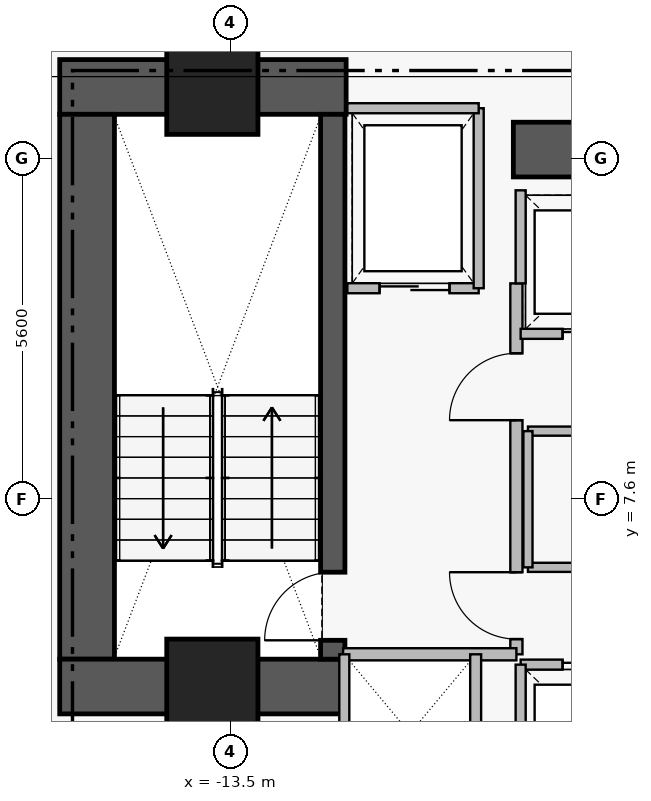
"""IFC4 building model, lengths in metres.
Left out: names, types, materials, properties, quantities, classifications, styles, units other than length and angle.
Written with IfcOpenShell. Run it as: python <this file> out.ifc"""

import sys

from ifc_helpers import new_model, si_unit, direction, frame, frame_2d, origin, origin_2d, place, context, subcontext, project, spatial, rectangle, extrude, element, fill, save


model = new_model("IFC4")
c1 = context("Model", 3, precision=1e-05, world=origin(), true_north=direction((0.0, 1.0)))
c2 = subcontext(c1, "Body", "Model", "MODEL_VIEW")
j1 = project(units=[si_unit("LENGTHUNIT", "METRE"), si_unit("PLANEANGLEUNIT", "RADIAN")], contexts=[c1])
p1 = place(None, origin())
s1 = spatial("IfcSite", under=j1, at=p1, CompositionType="ELEMENT")
p2 = place(p1, origin())
s2 = spatial("IfcBuilding", under=s1, at=p2, CompositionType="ELEMENT")
p3 = place(p2, frame((0.0, 0.0, 11.4)))
s3 = spatial("IfcBuildingStorey", under=s2, at=p3, CompositionType="ELEMENT", Elevation=11.4)
p4 = place(p3, frame((-16.31, 14.38, 0.0), z_axis=(0.0, 0.0, 1.0), x_axis=(1.0, 0.0, 0.0)))
e1 = element("IfcWall", 1, at=p4, inside=s3, PredefinedType="SHEAR", context=c2, shape_type="SweptSolid", body=[
    extrude(rectangle(XDim=4.71, YDim=0.9, at=frame_2d((2.355, 0.0))), origin(), (0.0, 0.0, 1.0), 6.41),
])
p5 = place(p3, frame((-15.86, 4.97, 0.0), z_axis=(0.0, 0.0, 1.0), x_axis=(0.0, 1.0, 0.0)))
e2 = element("IfcWall", 2, at=p5, inside=s3, PredefinedType="SHEAR", context=c2, shape_type="SweptSolid", body=[
    extrude(rectangle(XDim=8.96, YDim=0.9, at=frame_2d((4.48, 0.0))), origin(), (0.0, 0.0, 1.0), 6.41),
])
p6 = place(p3, frame((-16.31, 4.52, 0.0), z_axis=(0.0, 0.0, 1.0), x_axis=(1.0, 0.0, 0.0)))
e3 = element("IfcWall", 3, at=p6, inside=s3, PredefinedType="SHEAR", context=c2, shape_type="SweptSolid", body=[
    extrude(rectangle(XDim=4.71, YDim=0.9, at=frame_2d((2.355, 0.0))), origin(), (0.0, 0.0, 1.0), 6.41),
])
p7 = place(p3, frame((-8.85, 13.35, 0.0), z_axis=(0.0, 0.0, 1.0), x_axis=(1.0, 0.0, 0.0)))
e4 = element("IfcWall", 4, at=p7, inside=s3, PredefinedType="SHEAR", context=c2, shape_type="SweptSolid", body=[
    extrude(rectangle(XDim=7.6, YDim=0.9, at=frame_2d((3.8, 0.0))), origin(), (0.0, 0.0, 1.0), 6.34),
])
p8 = place(p3, frame((-11.82, 4.97, 0.0), z_axis=(0.0, 0.0, 1.0), x_axis=(0.0, 1.0, 0.0)))
e5 = element("IfcWall", 5, at=p8, inside=s3, PredefinedType="SHEAR", context=c2, shape_type="SweptSolid", body=[
    extrude(rectangle(XDim=8.96, YDim=0.4, at=frame_2d((4.48, 0.0))), origin(), (0.0, 0.0, 1.0), 6.41),
])
p9 = place(p8, frame((0.31, 0.0, 0.0)))
e6 = element("IfcOpeningElement", 6, at=p9, cuts=e5, PredefinedType="OPENING", context=c2, shape_type="SweptSolid", body=[
    extrude(rectangle(XDim=1.12, YDim=2.22, at=frame_2d((0.56, 1.11))), frame((0.0, 0.21, 0.0), z_axis=(0.0, -1.0, 0.0), x_axis=(1.0, 0.0, 0.0)), (0.0, 0.0, 1.0), 0.42),
])
for number, where, z_axis, x_axis in (
    (7, (-13.8, 14.35, 0.0), (0.0, 0.0, 1.0), (1.0, 0.0, 0.0)),
    (8, (-13.8, 4.55, 0.0), (0.0, 0.0, 1.0), (1.0, 0.0, 0.0)),
):
    element("IfcColumn", number, at=place(p3, frame(where, z_axis=z_axis, x_axis=x_axis)), inside=s3, PredefinedType="COLUMN", context=c2, shape_type="SweptSolid", body=[
        extrude(rectangle(XDim=1.5, YDim=1.5, at=origin_2d()), origin(), (0.0, 0.0, 1.0), 6.6),
    ])
p10 = place(p3, frame((-8.8, 5.05, 0.0), z_axis=(0.0, 0.0, 1.0), x_axis=(0.0, 1.0, 0.0)))
e9 = element("IfcWall", 9, at=p10, inside=s3, PredefinedType="PARTITIONING", context=c2, shape_type="SweptSolid", body=[
    extrude(rectangle(XDim=6.1, YDim=0.2, at=frame_2d((3.05, 0.0))), origin(), (0.0, 0.0, 1.0), 6.34),
])
p11 = place(p10, frame((0.25, 0.0, 0.0)))
e10 = element("IfcOpeningElement", 10, at=p11, cuts=e9, PredefinedType="OPENING", context=c2, shape_type="SweptSolid", body=[
    extrude(rectangle(XDim=1.1, YDim=2.2, at=frame_2d((0.55, 1.1))), frame((0.0, 0.11, 0.0), z_axis=(0.0, -1.0, 0.0), x_axis=(1.0, 0.0, 0.0)), (0.0, 0.0, 1.0), 0.22),
])
p12 = place(p10, frame((3.85, 0.0, 0.0)))
e11 = element("IfcOpeningElement", 11, at=p12, cuts=e9, PredefinedType="OPENING", context=c2, shape_type="SweptSolid", body=[
    extrude(rectangle(XDim=1.1, YDim=2.2, at=frame_2d((0.55, 1.1))), frame((0.0, 0.11, 0.0), z_axis=(0.0, -1.0, 0.0), x_axis=(1.0, 0.0, 0.0)), (0.0, 0.0, 1.0), 0.22),
])
p13 = place(p3, frame((-11.58, 11.07, 0.0), z_axis=(0.0, 0.0, 1.0), x_axis=(1.0, 0.0, 0.0)))
e12 = element("IfcWall", 12, at=p13, inside=s3, PredefinedType="PARTITIONING", context=c2, shape_type="SweptSolid", body=[
    extrude(rectangle(XDim=2.16, YDim=0.165, at=frame_2d((1.08, 0.0))), origin(), (0.0, 0.0, 1.0), 6.34),
])
p14 = place(p13, frame((0.53, 0.0, 0.0)))
e13 = element("IfcOpeningElement", 13, at=p14, cuts=e12, PredefinedType="OPENING", context=c2, shape_type="SweptSolid", body=[
    extrude(rectangle(XDim=1.15, YDim=2.25, at=frame_2d((0.575, 1.125))), frame((0.0, 0.093, 0.0), z_axis=(0.0, -1.0, 0.0), x_axis=(1.0, 0.0, 0.0)), (0.0, 0.0, 1.0), 0.185),
])
p15 = place(p3, frame((-8.73, 4.88, 0.0), z_axis=(0.0, 0.0, 1.0), x_axis=(1.0, 0.0, 0.0)))
e14 = element("IfcWall", 14, at=p15, inside=s3, PredefinedType="PARTITIONING", context=c2, shape_type="SweptSolid", body=[
    extrude(rectangle(XDim=2.48, YDim=0.165, at=frame_2d((1.24, 0.0))), origin(), (0.0, 0.0, 1.0), 6.34),
])
p16 = place(p15, frame((0.69, 0.0, 0.0)))
e15 = element("IfcOpeningElement", 15, at=p16, cuts=e14, PredefinedType="OPENING", context=c2, shape_type="SweptSolid", body=[
    extrude(rectangle(XDim=1.1, YDim=2.25, at=frame_2d((0.55, 1.125))), frame((0.0, 0.093, 0.0), z_axis=(0.0, -1.0, 0.0), x_axis=(1.0, 0.0, 0.0)), (0.0, 0.0, 1.0), 0.185),
])
p17 = place(p3, frame((-8.73, 10.32, 0.0), z_axis=(0.0, 0.0, 1.0), x_axis=(1.0, 0.0, 0.0)))
e16 = element("IfcWall", 16, at=p17, inside=s3, PredefinedType="PARTITIONING", context=c2, shape_type="SweptSolid", body=[
    extrude(rectangle(XDim=2.48, YDim=0.165, at=frame_2d((1.24, 0.0))), origin(), (0.0, 0.0, 1.0), 6.34),
])
p18 = place(p17, frame((0.69, 0.0, 0.0)))
e17 = element("IfcOpeningElement", 17, at=p18, cuts=e16, PredefinedType="OPENING", context=c2, shape_type="SweptSolid", body=[
    extrude(rectangle(XDim=1.1, YDim=2.25, at=frame_2d((0.55, 1.125))), frame((0.0, 0.093, 0.0), z_axis=(0.0, -1.0, 0.0), x_axis=(1.0, 0.0, 0.0)), (0.0, 0.0, 1.0), 0.185),
])
p19 = place(p3, frame((-8.61, 6.48, 0.0), z_axis=(0.0, 0.0, 1.0), x_axis=(1.0, 0.0, 0.0)))
e18 = element("IfcWall", 18, at=p19, inside=s3, PredefinedType="PARTITIONING", context=c2, shape_type="SweptSolid", body=[
    extrude(rectangle(XDim=7.29, YDim=0.15, at=frame_2d((3.645, 0.0))), origin(), (0.0, 0.0, 1.0), 6.34),
])
p20 = place(p19, frame((3.195, 0.0, 0.0)))
e19 = element("IfcOpeningElement", 19, at=p20, cuts=e18, PredefinedType="OPENING", context=c2, shape_type="SweptSolid", body=[
    extrude(rectangle(XDim=0.9, YDim=2.15, at=frame_2d((0.45, 1.075))), frame((0.0, 0.085, 0.0), z_axis=(0.0, -1.0, 0.0), x_axis=(1.0, 0.0, 0.0)), (0.0, 0.0, 1.0), 0.17),
])
p21 = place(p3, frame((-11.65, 5.05, 0.0), z_axis=(0.0, 0.0, 1.0), x_axis=(1.0, 0.0, 0.0)))
e20 = element("IfcWall", 20, at=p21, inside=s3, PredefinedType="PARTITIONING", context=c2, shape_type="SweptSolid", body=[
    extrude(rectangle(XDim=2.85, YDim=0.2, at=frame_2d((1.425, 0.0))), origin(), (0.0, 0.0, 1.0), 6.34),
])
p22 = place(p3, frame((-9.42, 11.07, 0.0), z_axis=(0.0, 0.0, 1.0), x_axis=(0.0, 1.0, 0.0)))
e21 = element("IfcWall", 21, at=p22, inside=s3, PredefinedType="PARTITIONING", context=c2, shape_type="SweptSolid", body=[
    extrude(rectangle(XDim=2.96, YDim=0.165, at=frame_2d((1.48, 0.0))), origin(), (0.0, 0.0, 1.0), 6.34),
])
p23 = place(p3, frame((-11.58, 14.03, 0.0), z_axis=(0.0, 0.0, 1.0), x_axis=(1.0, 0.0, 0.0)))
e22 = element("IfcWall", 22, at=p23, inside=s3, PredefinedType="PARTITIONING", context=c2, shape_type="SweptSolid", body=[
    extrude(rectangle(XDim=2.16, YDim=0.165, at=frame_2d((1.08, 0.0))), origin(), (0.0, 0.0, 1.0), 6.34),
])
p24 = place(p3, frame((-8.73, 2.52, 0.0), z_axis=(0.0, 0.0, 1.0), x_axis=(0.0, 1.0, 0.0)))
e23 = element("IfcWall", 23, at=p24, inside=s3, PredefinedType="PARTITIONING", context=c2, shape_type="SweptSolid", body=[
    extrude(rectangle(XDim=2.36, YDim=0.165, at=frame_2d((1.18, 0.0))), origin(), (0.0, 0.0, 1.0), 6.34),
])
p25 = place(p3, frame((-8.73, 11.15, 0.0), z_axis=(0.0, 0.0, 1.0), x_axis=(0.0, 1.0, 0.0)))
e24 = element("IfcWall", 24, at=p25, inside=s3, PredefinedType="PARTITIONING", context=c2, shape_type="SweptSolid", body=[
    extrude(rectangle(XDim=1.53, YDim=0.165, at=frame_2d((0.765, 0.0))), origin(), (0.0, 0.0, 1.0), 6.34),
])
p26 = place(p3, frame((-9.47, 2.45, 0.0), z_axis=(0.0, 0.0, 1.0), x_axis=(0.0, 1.0, 0.0)))
e25 = element("IfcWall", 25, at=p26, inside=s3, PredefinedType="PARTITIONING", context=c2, shape_type="SweptSolid", body=[
    extrude(rectangle(XDim=2.6, YDim=0.18, at=frame_2d((1.3, 0.0))), origin(), (0.0, 0.0, 1.0), 6.34),
])
p27 = place(p3, frame((-11.63, 2.47, 0.0), z_axis=(0.0, 0.0, 1.0), x_axis=(0.0, 1.0, 0.0)))
e26 = element("IfcWall", 26, at=p27, inside=s3, PredefinedType="PARTITIONING", context=c2, shape_type="SweptSolid", body=[
    extrude(rectangle(XDim=2.58, YDim=0.165, at=frame_2d((1.29, 0.0))), origin(), (0.0, 0.0, 1.0), 6.34),
])
p28 = place(p3, frame((-8.61, 8.72, 0.0), z_axis=(0.0, 0.0, 1.0), x_axis=(1.0, 0.0, 0.0)))
e27 = element("IfcWall", 27, at=p28, inside=s3, PredefinedType="PARTITIONING", context=c2, shape_type="SweptSolid", body=[
    extrude(rectangle(XDim=7.29, YDim=0.15, at=frame_2d((3.645, 0.0))), origin(), (0.0, 0.0, 1.0), 6.34),
])
p29 = place(p3, frame((-8.61, 6.48, 0.0), z_axis=(0.0, 0.0, 1.0), x_axis=(0.0, 1.0, 0.0)))
e28 = element("IfcWall", 28, at=p29, inside=s3, PredefinedType="PARTITIONING", context=c2, shape_type="SweptSolid", body=[
    extrude(rectangle(XDim=2.24, YDim=0.15, at=frame_2d((1.12, 0.0))), origin(), (0.0, 0.0, 1.0), 6.34),
])
p30 = place(p9, origin())
e29 = element("IfcDoor", 29, at=p30, inside=s3, OperationType="SINGLE_SWING_LEFT", PredefinedType="DOOR", context=c2, shape_type="SweptSolid", body=[
    extrude(rectangle(XDim=1.12, YDim=2.22, at=frame_2d((0.56, 1.11))), frame((0.0, 0.025, 0.0), z_axis=(0.0, -1.0, 0.0), x_axis=(1.0, 0.0, 0.0)), (0.0, 0.0, 1.0), 0.05),
])
fill(e6, e29)
p31 = place(p11, origin())
e30 = element("IfcDoor", 30, at=p31, inside=s3, OperationType="SINGLE_SWING_RIGHT", PredefinedType="DOOR", context=c2, shape_type="SweptSolid", body=[
    extrude(rectangle(XDim=1.1, YDim=2.2, at=frame_2d((0.55, 1.1))), frame((0.0, 0.025, 0.0), z_axis=(0.0, -1.0, 0.0), x_axis=(1.0, 0.0, 0.0)), (0.0, 0.0, 1.0), 0.05),
])
fill(e10, e30)
p32 = place(p12, origin())
e31 = element("IfcDoor", 31, at=p32, inside=s3, OperationType="SINGLE_SWING_LEFT", PredefinedType="DOOR", context=c2, shape_type="SweptSolid", body=[
    extrude(rectangle(XDim=1.1, YDim=2.2, at=frame_2d((0.55, 1.1))), frame((0.0, 0.025, 0.0), z_axis=(0.0, -1.0, 0.0), x_axis=(1.0, 0.0, 0.0)), (0.0, 0.0, 1.0), 0.05),
])
fill(e11, e31)
p33 = place(p14, origin())
e32 = element("IfcDoor", 32, at=p33, inside=s3, OperationType="SLIDING_TO_LEFT", PredefinedType="DOOR", context=c2, shape_type="SweptSolid", body=[
    extrude(rectangle(XDim=1.15, YDim=2.25, at=frame_2d((0.575, 1.125))), frame((0.0, 0.025, 0.0), z_axis=(0.0, -1.0, 0.0), x_axis=(1.0, 0.0, 0.0)), (0.0, 0.0, 1.0), 0.05),
])
fill(e13, e32)
p34 = place(p16, origin())
e33 = element("IfcDoor", 33, at=p34, inside=s3, OperationType="SLIDING_TO_LEFT", PredefinedType="DOOR", context=c2, shape_type="SweptSolid", body=[
    extrude(rectangle(XDim=1.1, YDim=2.25, at=frame_2d((0.55, 1.125))), frame((0.0, 0.025, 0.0), z_axis=(0.0, -1.0, 0.0), x_axis=(1.0, 0.0, 0.0)), (0.0, 0.0, 1.0), 0.05),
])
fill(e15, e33)
p35 = place(p18, origin())
e34 = element("IfcDoor", 34, at=p35, inside=s3, OperationType="SLIDING_TO_LEFT", PredefinedType="DOOR", context=c2, shape_type="SweptSolid", body=[
    extrude(rectangle(XDim=1.1, YDim=2.25, at=frame_2d((0.55, 1.125))), frame((0.0, 0.025, 0.0), z_axis=(0.0, -1.0, 0.0), x_axis=(1.0, 0.0, 0.0)), (0.0, 0.0, 1.0), 0.05),
])
fill(e17, e34)
save(model, sys.argv[1])
